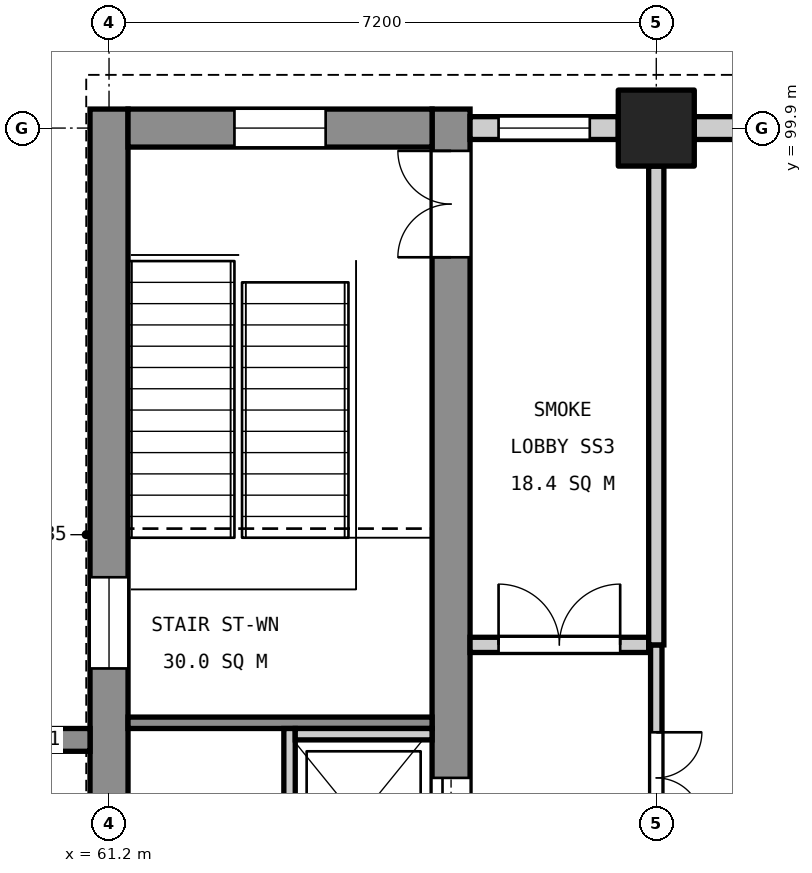
"""IFC4 building model, lengths in metres.
Left out: names, types, materials, properties, quantities, classifications, styles, units other than length and angle.
Written with IfcOpenShell. Run it as: python <this file> out.ifc"""

import sys

from ifc_helpers import new_model, si_unit, direction, frame, frame_2d, origin, origin_2d, place, context, subcontext, project, spatial, rectangle, extrude, element, fill, save


model = new_model("IFC4")
c1 = context("Model", 3, precision=1e-05, world=origin(), true_north=direction((0.0, 1.0)))
c2 = subcontext(c1, "Body", "Model", "MODEL_VIEW")
j1 = project(units=[si_unit("LENGTHUNIT", "METRE"), si_unit("PLANEANGLEUNIT", "RADIAN")], contexts=[c1])
p1 = place(None, origin())
s1 = spatial("IfcSite", under=j1, at=p1, CompositionType="ELEMENT")
p2 = place(p1, origin())
s2 = spatial("IfcBuilding", under=s1, at=p2, CompositionType="ELEMENT")
p3 = place(p2, frame((0.0, 0.0, 22.2)))
s3 = spatial("IfcBuildingStorey", under=s2, at=p3, CompositionType="ELEMENT", Elevation=22.2)
p4 = place(p3, frame((68.4, 99.9, 0.0), z_axis=(0.0, 0.0, 1.0), x_axis=(1.0, 0.0, 0.0)))
e1 = element("IfcColumn", 1, at=p4, inside=s3, PredefinedType="COLUMN", context=c2, shape_type="SweptSolid", body=[
    extrude(rectangle(XDim=1.0, YDim=1.0, at=origin_2d()), origin(), (0.0, 0.0, 1.0), 4.8),
])
p5 = place(p3, frame((61.2, 88.85, 0.0), z_axis=(0.0, 0.0, 1.0), x_axis=(0.0, 1.0, 0.0)))
e2 = element("IfcWall", 2, at=p5, inside=s3, PredefinedType="SHEAR", context=c2, shape_type="SweptSolid", body=[
    extrude(rectangle(XDim=11.3, YDim=0.5, at=frame_2d((5.65, 0.0))), origin(), (0.0, 0.0, 1.0), 4.55),
])
p6 = place(p5, frame((3.94, 0.0, 3.4)))
e3 = element("IfcOpeningElement", 3, at=p6, cuts=e2, PredefinedType="OPENING", context=c2, shape_type="SweptSolid", body=[
    extrude(rectangle(XDim=1.2, YDim=0.9, at=frame_2d((0.6, 0.45))), frame((0.0, 0.26, 0.0), z_axis=(0.0, -1.0, 0.0), x_axis=(1.0, 0.0, 0.0)), (0.0, 0.0, 1.0), 0.52),
])
p7 = place(p3, frame((65.7, 88.85, 0.0), z_axis=(0.0, 0.0, 1.0), x_axis=(0.0, 1.0, 0.0)))
e4 = element("IfcWall", 4, at=p7, inside=s3, PredefinedType="SHEAR", context=c2, shape_type="SweptSolid", body=[
    extrude(rectangle(XDim=11.3, YDim=0.5, at=frame_2d((5.65, 0.0))), origin(), (0.0, 0.0, 1.0), 4.55),
])
p8 = place(p7, frame((9.35, 0.0, 0.0)))
e5 = element("IfcOpeningElement", 5, at=p8, cuts=e4, PredefinedType="OPENING", context=c2, shape_type="SweptSolid", body=[
    extrude(rectangle(XDim=1.4, YDim=2.1, at=frame_2d((0.7, 1.05))), frame((0.0, 0.26, 0.0), z_axis=(0.0, -1.0, 0.0), x_axis=(1.0, 0.0, 0.0)), (0.0, 0.0, 1.0), 0.52),
])
p9 = place(p7, frame((1.4, 0.0, 0.0)))
e6 = element("IfcOpeningElement", 6, at=p9, cuts=e4, PredefinedType="OPENING", context=c2, shape_type="SweptSolid", body=[
    extrude(rectangle(XDim=1.1, YDim=2.1, at=frame_2d((0.55, 1.05))), frame((0.0, 0.26, 0.0), z_axis=(0.0, -1.0, 0.0), x_axis=(1.0, 0.0, 0.0)), (0.0, 0.0, 1.0), 0.52),
])
p10 = place(p3, frame((61.45, 99.9, 0.0), z_axis=(0.0, 0.0, 1.0), x_axis=(1.0, 0.0, 0.0)))
e7 = element("IfcWall", 7, at=p10, inside=s3, PredefinedType="SHEAR", context=c2, shape_type="SweptSolid", body=[
    extrude(rectangle(XDim=4.0, YDim=0.5, at=frame_2d((2.0, 0.0))), origin(), (0.0, 0.0, 1.0), 4.55),
])
p11 = place(p10, frame((1.4, 0.0, 3.4)))
e8 = element("IfcOpeningElement", 8, at=p11, cuts=e7, PredefinedType="OPENING", context=c2, shape_type="SweptSolid", body=[
    extrude(rectangle(XDim=1.2, YDim=0.9, at=frame_2d((0.6, 0.45))), frame((0.0, 0.26, 0.0), z_axis=(0.0, -1.0, 0.0), x_axis=(1.0, 0.0, 0.0)), (0.0, 0.0, 1.0), 0.52),
])
p12 = place(p3, frame((60.95, 91.85, 0.0), z_axis=(0.0, 0.0, 1.0), x_axis=(-1.0, 0.0, 0.0)))
e9 = element("IfcWall", 9, at=p12, inside=s3, PredefinedType="SHEAR", context=c2, shape_type="SweptSolid", body=[
    extrude(rectangle(XDim=1.25, YDim=0.3, at=frame_2d((0.625, 0.0))), origin(), (0.0, 0.0, 1.0), 4.8),
])
p13 = place(p3, frame((61.45, 92.075, 0.0), z_axis=(0.0, 0.0, 1.0), x_axis=(1.0, 0.0, 0.0)))
e10 = element("IfcWall", 10, at=p13, inside=s3, PredefinedType="SOLIDWALL", context=c2, shape_type="SweptSolid", body=[
    extrude(rectangle(XDim=4.0, YDim=0.15, at=frame_2d((2.0, 0.0))), origin(), (0.0, 0.0, 1.0), 4.55),
])
p14 = place(p3, frame((63.575, 92.0, 0.0), z_axis=(0.0, 0.0, 1.0), x_axis=(0.0, -1.0, 0.0)))
e11 = element("IfcWall", 11, at=p14, inside=s3, PredefinedType="SOLIDWALL", context=c2, shape_type="SweptSolid", body=[
    extrude(rectangle(XDim=2.65, YDim=0.15, at=frame_2d((1.325, 0.0))), origin(), (0.0, 0.0, 1.0), 4.8),
])
p15 = place(p3, frame((63.65, 91.925, 0.0), z_axis=(0.0, 0.0, 1.0), x_axis=(1.0, 0.0, 0.0)))
e12 = element("IfcWall", 12, at=p15, inside=s3, PredefinedType="SOLIDWALL", context=c2, shape_type="SweptSolid", body=[
    extrude(rectangle(XDim=1.8, YDim=0.15, at=frame_2d((0.9, 0.0))), origin(), (0.0, 0.0, 1.0), 4.8),
])
p16 = place(p3, frame((65.95, 99.9, 0.0), z_axis=(0.0, 0.0, 1.0), x_axis=(1.0, 0.0, 0.0)))
e13 = element("IfcWall", 13, at=p16, inside=s3, PredefinedType="STANDARD", context=c2, shape_type="SweptSolid", body=[
    extrude(rectangle(XDim=1.95, YDim=0.3, at=frame_2d((0.975, 0.0))), origin(), (0.0, 0.0, 1.0), 3.85),
])
p17 = place(p16, frame((0.375, 0.0, 0.9)))
e14 = element("IfcOpeningElement", 14, at=p17, cuts=e13, PredefinedType="OPENING", context=c2, shape_type="SweptSolid", body=[
    extrude(rectangle(XDim=1.2, YDim=2.4, at=frame_2d((0.6, 1.2))), frame((0.0, 0.16, 0.0), z_axis=(0.0, -1.0, 0.0), x_axis=(1.0, 0.0, 0.0)), (0.0, 0.0, 1.0), 0.32),
])
p18 = place(p3, frame((68.9, 99.9, 0.0), z_axis=(0.0, 0.0, 1.0), x_axis=(1.0, 0.0, 0.0)))
e15 = element("IfcWall", 15, at=p18, inside=s3, PredefinedType="STANDARD", context=c2, shape_type="SweptSolid", body=[
    extrude(rectangle(XDim=9.8, YDim=0.3, at=frame_2d((4.9, 0.0))), origin(), (0.0, 0.0, 1.0), 3.85),
])
p19 = place(p18, frame((0.65, 0.0, 0.9)))
e16 = element("IfcOpeningElement", 16, at=p19, cuts=e15, PredefinedType="OPENING", context=c2, shape_type="SweptSolid", body=[
    extrude(rectangle(XDim=1.8, YDim=2.4, at=frame_2d((0.9, 1.2))), frame((0.0, 0.16, 0.0), z_axis=(0.0, -1.0, 0.0), x_axis=(1.0, 0.0, 0.0)), (0.0, 0.0, 1.0), 0.32),
])
p20 = place(p18, frame((4.525, 0.0, 0.8)))
e17 = element("IfcOpeningElement", 17, at=p20, cuts=e15, PredefinedType="OPENING", context=c2, shape_type="SweptSolid", body=[
    extrude(rectangle(XDim=0.75, YDim=1.2, at=frame_2d((0.375, 0.6))), frame((0.0, 0.16, 0.0), z_axis=(0.0, -1.0, 0.0), x_axis=(1.0, 0.0, 0.0)), (0.0, 0.0, 1.0), 0.32),
])
p21 = place(p18, frame((7.35, 0.0, 0.9)))
e18 = element("IfcOpeningElement", 18, at=p21, cuts=e15, PredefinedType="OPENING", context=c2, shape_type="SweptSolid", body=[
    extrude(rectangle(XDim=1.8, YDim=2.4, at=frame_2d((0.9, 1.2))), frame((0.0, 0.16, 0.0), z_axis=(0.0, -1.0, 0.0), x_axis=(1.0, 0.0, 0.0)), (0.0, 0.0, 1.0), 0.32),
])
p22 = place(p3, frame((65.95, 93.1, 0.0), z_axis=(0.0, 0.0, 1.0), x_axis=(1.0, 0.0, 0.0)))
e19 = element("IfcWall", 19, at=p22, inside=s3, PredefinedType="PARTITIONING", context=c2, shape_type="SweptSolid", body=[
    extrude(rectangle(XDim=2.35, YDim=0.2, at=frame_2d((1.175, 0.0))), origin(), (0.0, 0.0, 1.0), 3.55),
])
p23 = place(p22, frame((0.375, 0.0, 0.0)))
e20 = element("IfcOpeningElement", 20, at=p23, cuts=e19, PredefinedType="OPENING", context=c2, shape_type="SweptSolid", body=[
    extrude(rectangle(XDim=1.6, YDim=2.1, at=frame_2d((0.8, 1.05))), frame((0.0, 0.11, 0.0), z_axis=(0.0, -1.0, 0.0), x_axis=(1.0, 0.0, 0.0)), (0.0, 0.0, 1.0), 0.22),
])
p24 = place(p3, frame((68.4, 89.6, 0.0), z_axis=(0.0, 0.0, 1.0), x_axis=(0.0, 1.0, 0.0)))
e21 = element("IfcWall", 21, at=p24, inside=s3, PredefinedType="PARTITIONING", context=c2, shape_type="SweptSolid", body=[
    extrude(rectangle(XDim=3.5, YDim=0.15, at=frame_2d((1.75, 0.0))), origin(), (0.0, 0.0, 1.0), 3.55),
])
p25 = place(p24, frame((1.15, 0.0, 0.0)))
e22 = element("IfcOpeningElement", 22, at=p25, cuts=e21, PredefinedType="OPENING", context=c2, shape_type="SweptSolid", body=[
    extrude(rectangle(XDim=1.2, YDim=2.1, at=frame_2d((0.6, 1.05))), frame((0.0, 0.085, 0.0), z_axis=(0.0, -1.0, 0.0), x_axis=(1.0, 0.0, 0.0)), (0.0, 0.0, 1.0), 0.17),
])
p26 = place(p3, frame((68.4, 93.1, 0.0), z_axis=(0.0, 0.0, 1.0), x_axis=(0.0, 1.0, 0.0)))
e23 = element("IfcWall", 23, at=p26, inside=s3, PredefinedType="PARTITIONING", context=c2, shape_type="SweptSolid", body=[
    extrude(rectangle(XDim=6.3, YDim=0.2, at=frame_2d((3.15, 0.0))), origin(), (0.0, 0.0, 1.0), 3.55),
])
p27 = place(p8, origin())
e24 = element("IfcDoor", 24, at=p27, inside=s3, OperationType="DOUBLE_DOOR_SINGLE_SWING", PredefinedType="DOOR", context=c2, shape_type="SweptSolid", body=[
    extrude(rectangle(XDim=1.4, YDim=2.1, at=frame_2d((0.7, 1.05))), frame((0.0, 0.025, 0.0), z_axis=(0.0, -1.0, 0.0), x_axis=(1.0, 0.0, 0.0)), (0.0, 0.0, 1.0), 0.05),
])
fill(e5, e24)
p28 = place(p9, origin())
e25 = element("IfcDoor", 25, at=p28, inside=s3, OperationType="SLIDING_TO_LEFT", PredefinedType="DOOR", context=c2, shape_type="SweptSolid", body=[
    extrude(rectangle(XDim=1.1, YDim=2.1, at=frame_2d((0.55, 1.05))), frame((0.0, 0.025, 0.0), z_axis=(0.0, -1.0, 0.0), x_axis=(1.0, 0.0, 0.0)), (0.0, 0.0, 1.0), 0.05),
])
fill(e6, e25)
p29 = place(p17, origin())
e26 = element("IfcWindow", 26, at=p29, inside=s3, PartitioningType="SINGLE_PANEL", PredefinedType="WINDOW", context=c2, shape_type="SweptSolid", body=[
    extrude(rectangle(XDim=1.2, YDim=2.4, at=frame_2d((0.6, 1.2))), frame((0.0, 0.03, 0.0), z_axis=(0.0, -1.0, 0.0), x_axis=(1.0, 0.0, 0.0)), (0.0, 0.0, 1.0), 0.06),
])
fill(e14, e26)
p30 = place(p6, origin())
e27 = element("IfcWindow", 27, at=p30, inside=s3, PartitioningType="SINGLE_PANEL", PredefinedType="WINDOW", context=c2, shape_type="SweptSolid", body=[
    extrude(rectangle(XDim=1.2, YDim=0.9, at=frame_2d((0.6, 0.45))), frame((0.0, 0.03, 0.0), z_axis=(0.0, -1.0, 0.0), x_axis=(1.0, 0.0, 0.0)), (0.0, 0.0, 1.0), 0.06),
])
fill(e3, e27)
p31 = place(p11, origin())
e28 = element("IfcWindow", 28, at=p31, inside=s3, PartitioningType="SINGLE_PANEL", PredefinedType="WINDOW", context=c2, shape_type="SweptSolid", body=[
    extrude(rectangle(XDim=1.2, YDim=0.9, at=frame_2d((0.6, 0.45))), frame((0.0, 0.03, 0.0), z_axis=(0.0, -1.0, 0.0), x_axis=(1.0, 0.0, 0.0)), (0.0, 0.0, 1.0), 0.06),
])
fill(e8, e28)
p32 = place(p25, frame((1.2, 0.0, 0.0), z_axis=(0.0, 0.0, 1.0), x_axis=(-1.0, 0.0, 0.0)))
e29 = element("IfcDoor", 29, at=p32, inside=s3, OperationType="DOUBLE_DOOR_SINGLE_SWING", PredefinedType="DOOR", context=c2, shape_type="SweptSolid", body=[
    extrude(rectangle(XDim=1.2, YDim=2.1, at=frame_2d((0.6, 1.05))), frame((0.0, 0.025, 0.0), z_axis=(0.0, -1.0, 0.0), x_axis=(1.0, 0.0, 0.0)), (0.0, 0.0, 1.0), 0.05),
])
fill(e22, e29)
p33 = place(p23, origin())
e30 = element("IfcDoor", 30, at=p33, inside=s3, OperationType="DOUBLE_DOOR_SINGLE_SWING", PredefinedType="DOOR", context=c2, shape_type="SweptSolid", body=[
    extrude(rectangle(XDim=1.6, YDim=2.1, at=frame_2d((0.8, 1.05))), frame((0.0, 0.025, 0.0), z_axis=(0.0, -1.0, 0.0), x_axis=(1.0, 0.0, 0.0)), (0.0, 0.0, 1.0), 0.05),
])
fill(e20, e30)
save(model, sys.argv[1])
